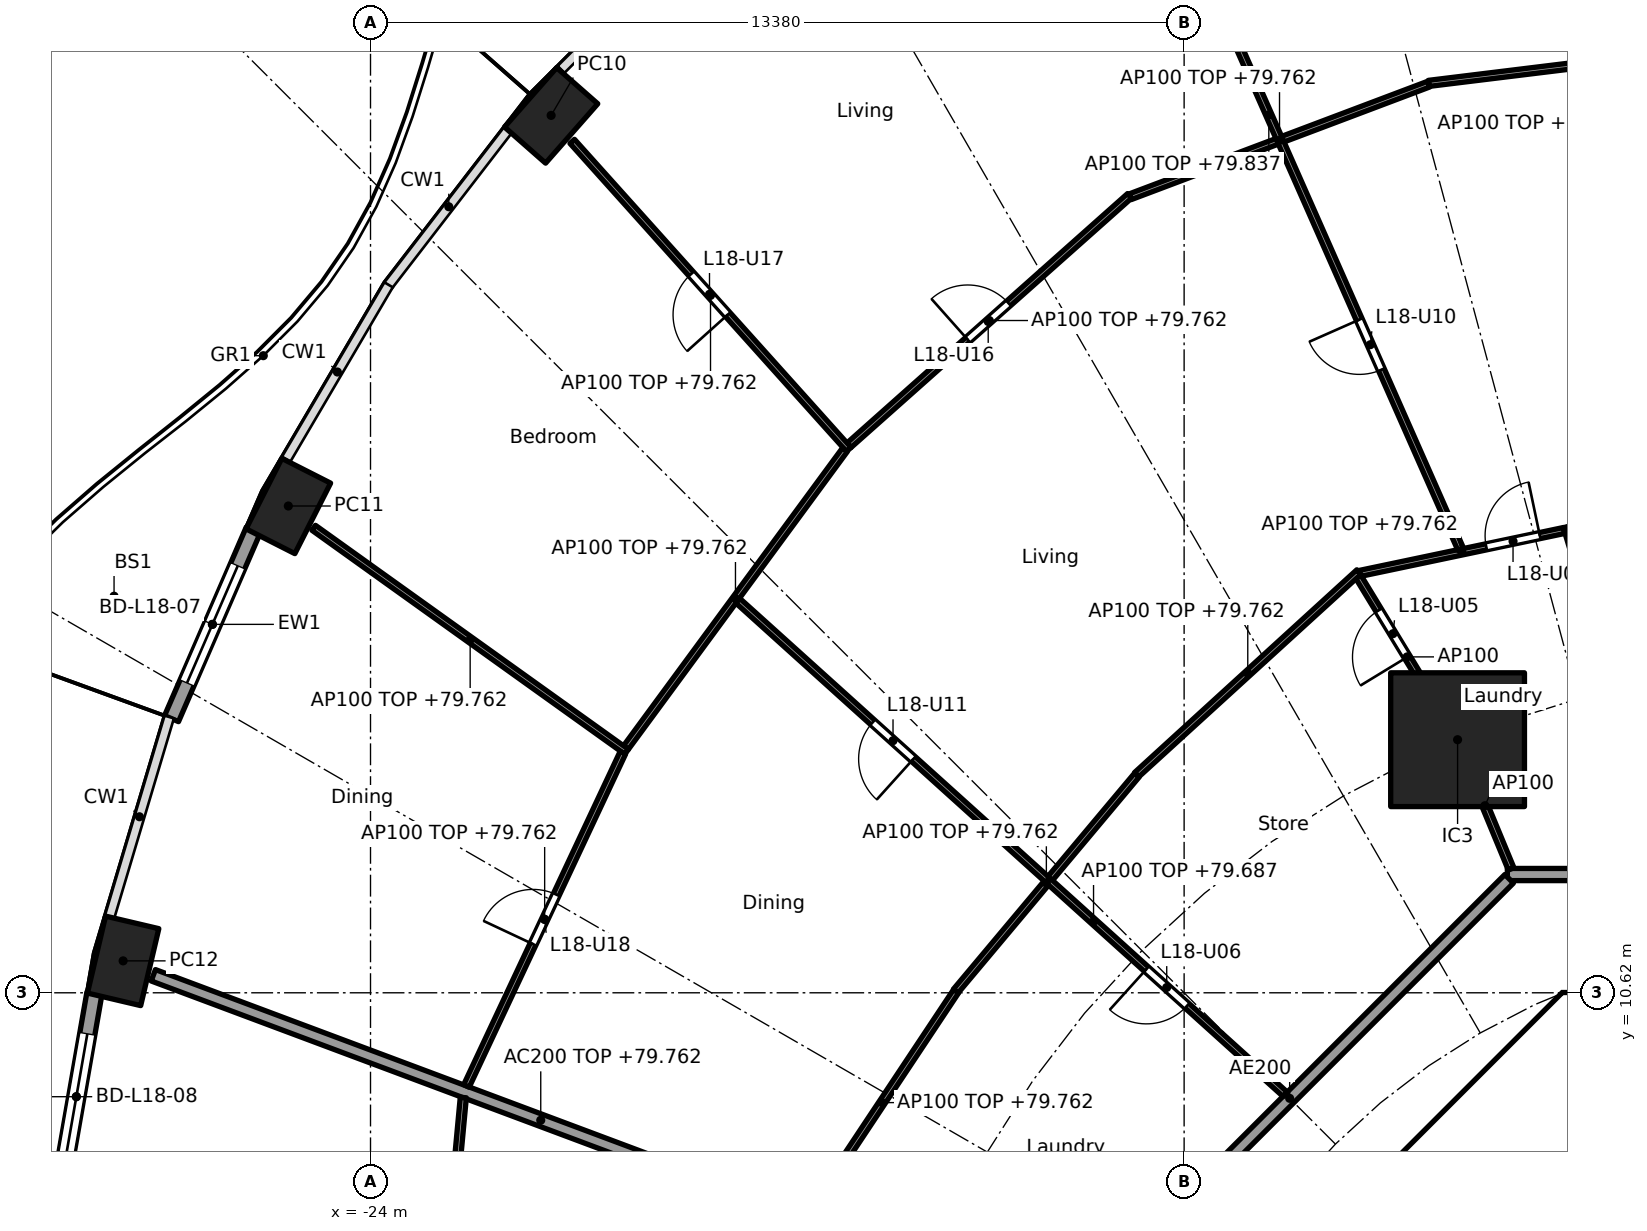
"""IFC4 building model, lengths in metres.
Left out: names, types, materials, properties, quantities, classifications, styles, units other than length and angle.
Written with IfcOpenShell. Run it as: python <this file> out.ifc"""

import sys

from ifc_helpers import new_model, si_unit, direction, frame, frame_2d, origin, origin_2d, place, context, subcontext, project, spatial, polyline, rectangle, hollow_rectangle, outline, extrude, element, fill, save


model = new_model("IFC4")
c1 = context("Model", 3, precision=1e-05, world=origin(), true_north=direction((0.0, 1.0)))
c2 = subcontext(c1, "Body", "Model", "MODEL_VIEW")
j1 = project(units=[si_unit("LENGTHUNIT", "METRE"), si_unit("PLANEANGLEUNIT", "RADIAN")], contexts=[c1])
p1 = place(None, origin())
s1 = spatial("IfcSite", under=j1, at=p1, CompositionType="ELEMENT")
p2 = place(p1, origin())
s2 = spatial("IfcBuilding", under=s1, at=p2, CompositionType="ELEMENT")
p3 = place(p2, frame((0.0, 0.0, 77.0)))
s3 = spatial("IfcBuildingStorey", under=s2, at=p3, CompositionType="ELEMENT", Elevation=77.0)
for number, where, z_axis, x_axis in (
    (1, (-21.03, 25.049, 0.0), (0.0, 0.0, 1.0), (-0.66, -0.751, 0.0)),
    (2, (-25.352, 18.625, 0.0), (0.0, 0.0, 1.0), (-0.452, -0.892, 0.0)),
    (3, (-28.068, 11.145, 0.0), (0.0, 0.0, 1.0), (-0.229, -0.973, 0.0)),
):
    element("IfcColumn", number, at=place(p3, frame(where, z_axis=z_axis, x_axis=x_axis)), inside=s3, PredefinedType="COLUMN", context=c2, shape_type="SweptSolid", body=[
        extrude(hollow_rectangle(XDim=1.3, YDim=0.9, WallThickness=0.045, at=origin_2d()), origin(), (0.0, 0.0, 1.0), 3.7),
    ])
p4 = place(p3, frame((-6.123, 14.782, 0.0), z_axis=(0.0, 0.0, 1.0), x_axis=(1.0, 0.0, 0.0)))
e4 = element("IfcColumn", 4, at=p4, inside=s3, PredefinedType="COLUMN", context=c2, shape_type="SweptSolid", body=[
    extrude(rectangle(XDim=2.2, YDim=2.2, at=origin_2d()), origin(), (0.0, 0.0, 1.0), 3.7),
])
p5 = place(p3, frame((-27.272, 15.128, 0.0), z_axis=(0.0, 0.0, 1.0), x_axis=(0.397682447205, 0.917523117521, 0.0)))
e5 = element("IfcWall", 5, at=p5, inside=s3, PredefinedType="SOLIDWALL", context=c2, shape_type="SweptSolid", body=[
    extrude(rectangle(XDim=3.38, YDim=0.25, at=frame_2d((1.69, 0.0))), origin(), (0.0, 0.0, 1.0), 3.44),
])
p6 = place(p5, frame((0.64, 0.0, 0.0)))
e6 = element("IfcOpeningElement", 6, at=p6, cuts=e5, PredefinedType="OPENING", context=c2, shape_type="SweptSolid", body=[
    extrude(rectangle(XDim=2.1, YDim=2.4, at=frame_2d((1.05, 1.2))), frame((0.0, 0.135, 0.0), z_axis=(0.0, -1.0, 0.0), x_axis=(1.0, 0.0, 0.0)), (0.0, 0.0, 1.0), 0.27),
])
p7 = place(p3, frame((-29.135, 7.21, 0.0), z_axis=(0.0, 0.0, 1.0), x_axis=(0.17223289558, 0.985056257114, 0.0)))
e7 = element("IfcWall", 7, at=p7, inside=s3, PredefinedType="SOLIDWALL", context=c2, shape_type="SweptSolid", body=[
    extrude(rectangle(XDim=3.454, YDim=0.25, at=frame_2d((1.727, 0.0))), origin(), (0.0, 0.0, 1.0), 3.44),
])
p8 = place(p7, frame((0.677, 0.0, 0.0)))
e8 = element("IfcOpeningElement", 8, at=p8, cuts=e7, PredefinedType="OPENING", context=c2, shape_type="SweptSolid", body=[
    extrude(rectangle(XDim=2.1, YDim=2.4, at=frame_2d((1.05, 1.2))), frame((0.0, 0.135, 0.0), z_axis=(0.0, -1.0, 0.0), x_axis=(1.0, 0.0, 0.0)), (0.0, 0.0, 1.0), 0.27),
])
p9 = place(p3, frame((-4.613, 9.988, 0.0), z_axis=(0.0, 0.0, 1.0), x_axis=(-0.707106781187, -0.707106781187, 0.0)))
e9 = element("IfcWall", 9, at=p9, inside=s3, PredefinedType="SHEAR", context=c2, shape_type="SweptSolid", body=[
    extrude(rectangle(XDim=7.602, YDim=0.6, at=frame_2d((3.801, 0.0))), origin(), (0.0, 0.0, 1.0), 3.44),
])
p10 = place(p9, frame((0.351, 0.0, 0.0)))
e10 = element("IfcOpeningElement", 10, at=p10, cuts=e9, PredefinedType="OPENING", context=c2, shape_type="SweptSolid", body=[
    extrude(rectangle(XDim=1.1, YDim=2.1, at=frame_2d((0.55, 1.05))), frame((0.0, 0.31, 0.0), z_axis=(0.0, -1.0, 0.0), x_axis=(1.0, 0.0, 0.0)), (0.0, 0.0, 1.0), 0.62),
])
p11 = place(p3, origin())
e11 = element("IfcWall", 11, at=p11, inside=s3, PredefinedType="SHEAR", context=c2, shape_type="SweptSolid", body=[
    extrude(outline(polyline([(-4.152, 10.025), (-4.401, 9.776), (-4.825, 10.2), (-4.401, 10.625), (4.401, 10.625), (4.825, 10.2), (4.401, 9.776), (4.152, 10.025), (-4.152, 10.025)])), origin(), (0.0, 0.0, 1.0), 3.44),
])
p12 = place(p3, frame((-14.829, 6.14, 0.0), z_axis=(0.0, 0.0, 1.0), x_axis=(-0.936597324342, 0.35040755134, 0.0)))
e12 = element("IfcWall", 12, at=p12, inside=s3, PredefinedType="PARTITIONING", context=c2, shape_type="SweptSolid", body=[
    extrude(rectangle(XDim=13.606, YDim=0.2, at=frame_2d((6.803, 0.0))), origin(), (0.0, 0.0, 1.0), 2.762),
])
p13 = place(p3, frame((5.104, 12.565, 0.0), z_axis=(0.0, 0.0, 1.0), x_axis=(-1.0, 0.0, 0.0)))
e13 = element("IfcWall", 13, at=p13, inside=s3, PredefinedType="PARTITIONING", context=c2, shape_type="SweptSolid", body=[
    extrude(rectangle(XDim=10.409, YDim=0.2, at=frame_2d((5.205, 0.0))), origin(), (0.0, 0.0, 1.0), 3.44),
])
p14 = place(p13, frame((0.751, 0.0, 0.0)))
e14 = element("IfcOpeningElement", 14, at=p14, cuts=e13, PredefinedType="OPENING", context=c2, shape_type="SweptSolid", body=[
    extrude(rectangle(XDim=1.0, YDim=2.1, at=frame_2d((0.5, 1.05))), frame((0.0, 0.11, 0.0), z_axis=(0.0, -1.0, 0.0), x_axis=(1.0, 0.0, 0.0)), (0.0, 0.0, 1.0), 0.22),
])
p15 = place(p3, frame((-5.275, 12.494, 0.0), z_axis=(0.0, 0.0, 1.0), x_axis=(-0.707106781187, -0.707106781187, 0.0)))
e15 = element("IfcWall", 15, at=p15, inside=s3, PredefinedType="PARTITIONING", context=c2, shape_type="SweptSolid", body=[
    extrude(rectangle(XDim=10.209, YDim=0.2, at=frame_2d((5.104, 0.0))), origin(), (0.0, 0.0, 1.0), 3.44),
])
p16 = place(p3, frame((-1.066, 26.253, 0.0), z_axis=(0.0, 0.0, 1.0), x_axis=(-0.992574197255, -0.121640712523, 0.0)))
e16 = element("IfcWall", 16, at=p16, inside=s3, PredefinedType="PARTITIONING", context=c2, shape_type="SweptSolid", body=[
    extrude(rectangle(XDim=5.574, YDim=0.1, at=frame_2d((2.787, 0.0))), origin(), (0.0, 0.0, 1.0), 2.762),
])
p17 = place(p16, frame((0.969, 0.0, 0.0)))
e17 = element("IfcOpeningElement", 17, at=p17, cuts=e16, PredefinedType="OPENING", context=c2, shape_type="SweptSolid", body=[
    extrude(rectangle(XDim=0.9, YDim=2.1, at=frame_2d((0.45, 1.05))), frame((0.0, 0.06, 0.0), z_axis=(0.0, -1.0, 0.0), x_axis=(1.0, 0.0, 0.0)), (0.0, 0.0, 1.0), 0.12),
])
p18 = place(p3, frame((-3.842, 25.963, 0.0), z_axis=(0.0, 0.0, 1.0), x_axis=(-0.184068442651, 0.982913428752, 0.0)))
e18 = element("IfcWall", 18, at=p18, inside=s3, PredefinedType="PARTITIONING", context=c2, shape_type="SweptSolid", body=[
    extrude(rectangle(XDim=8.506, YDim=0.1, at=frame_2d((4.253, 0.0))), origin(), (0.0, 0.0, 1.0), 2.837),
])
p19 = place(p18, frame((3.803, 0.0, 0.0)))
e19 = element("IfcOpeningElement", 19, at=p19, cuts=e18, PredefinedType="OPENING", context=c2, shape_type="SweptSolid", body=[
    extrude(rectangle(XDim=0.9, YDim=2.1, at=frame_2d((0.45, 1.05))), frame((0.0, 0.06, 0.0), z_axis=(0.0, -1.0, 0.0), x_axis=(1.0, 0.0, 0.0)), (0.0, 0.0, 1.0), 0.12),
])
p20 = place(p3, frame((-2.631, 12.66, 0.0), z_axis=(0.0, 0.0, 1.0), x_axis=(-0.290145836284, 0.956982441682, 0.0)))
e20 = element("IfcWall", 20, at=p20, inside=s3, PredefinedType="PARTITIONING", context=c2, shape_type="SweptSolid", body=[
    extrude(rectangle(XDim=5.873, YDim=0.1, at=frame_2d((2.937, 0.0))), origin(), (0.0, 0.0, 1.0), 2.687),
])
p21 = place(p20, frame((0.772, 0.0, 0.0)))
e21 = element("IfcOpeningElement", 21, at=p21, cuts=e20, PredefinedType="OPENING", context=c2, shape_type="SweptSolid", body=[
    extrude(rectangle(XDim=0.9, YDim=2.1, at=frame_2d((0.45, 1.05))), frame((0.0, 0.06, 0.0), z_axis=(0.0, -1.0, 0.0), x_axis=(1.0, 0.0, 0.0)), (0.0, 0.0, 1.0), 0.12),
])
p22 = place(p3, frame((-4.37, 18.223, 0.0), z_axis=(0.0, 0.0, 1.0), x_axis=(-0.978619056583, -0.205681166112, 0.0)))
e22 = element("IfcWall", 22, at=p22, inside=s3, PredefinedType="PARTITIONING", context=c2, shape_type="SweptSolid", body=[
    extrude(rectangle(XDim=3.438, YDim=0.1, at=frame_2d((1.719, 0.0))), origin(), (0.0, 0.0, 1.0), 2.762),
])
p23 = place(p22, frame((0.409, 0.0, 0.0)))
e23 = element("IfcOpeningElement", 23, at=p23, cuts=e22, PredefinedType="OPENING", context=c2, shape_type="SweptSolid", body=[
    extrude(rectangle(XDim=0.9, YDim=2.1, at=frame_2d((0.45, 1.05))), frame((0.0, 0.06, 0.0), z_axis=(0.0, -1.0, 0.0), x_axis=(1.0, 0.0, 0.0)), (0.0, 0.0, 1.0), 0.12),
])
p24 = place(p3, frame((-6.596, 25.563, 0.0), z_axis=(0.0, 0.0, 1.0), x_axis=(-0.9356162121, -0.353018843201, 0.0)))
e24 = element("IfcWall", 24, at=p24, inside=s3, PredefinedType="PARTITIONING", context=c2, shape_type="SweptSolid", body=[
    extrude(rectangle(XDim=5.249, YDim=0.1, at=frame_2d((2.625, 0.0))), origin(), (0.0, 0.0, 1.0), 2.762),
])
p25 = place(p3, frame((-6.072, 17.915, 0.0), z_axis=(0.0, 0.0, 1.0), x_axis=(-0.404139814253, 0.914697223422, 0.0)))
e25 = element("IfcWall", 25, at=p25, inside=s3, PredefinedType="PARTITIONING", context=c2, shape_type="SweptSolid", body=[
    extrude(rectangle(XDim=15.614, YDim=0.1, at=frame_2d((7.807, 0.0))), origin(), (0.0, 0.0, 1.0), 2.837),
])
p26 = place(p25, frame((3.226, 0.0, 0.0)))
e26 = element("IfcOpeningElement", 26, at=p26, cuts=e25, PredefinedType="OPENING", context=c2, shape_type="SweptSolid", body=[
    extrude(rectangle(XDim=0.9, YDim=2.1, at=frame_2d((0.45, 1.05))), frame((0.0, 0.06, 0.0), z_axis=(0.0, -1.0, 0.0), x_axis=(1.0, 0.0, 0.0)), (0.0, 0.0, 1.0), 0.12),
])
p27 = place(p3, frame((-5.243, 12.657, 0.0), z_axis=(0.0, 0.0, 1.0), x_axis=(-0.382703272338, 0.923871314276, 0.0)))
e27 = element("IfcWall", 27, at=p27, inside=s3, PredefinedType="PARTITIONING", context=c2, shape_type="SweptSolid", body=[
    extrude(rectangle(XDim=2.249, YDim=0.1, at=frame_2d((1.125, 0.0))), origin(), (0.0, 0.0, 1.0), 3.44),
])
p28 = place(p3, frame((-6.149, 14.825, 0.0), z_axis=(0.0, 0.0, 1.0), x_axis=(-0.520433196839, 0.853902387646, 0.0)))
e28 = element("IfcWall", 28, at=p28, inside=s3, PredefinedType="PARTITIONING", context=c2, shape_type="SweptSolid", body=[
    extrude(rectangle(XDim=3.09, YDim=0.1, at=frame_2d((1.545, 0.0))), origin(), (0.0, 0.0, 1.0), 3.44),
])
p29 = place(p28, frame((1.542, 0.0, 0.0)))
e29 = element("IfcOpeningElement", 29, at=p29, cuts=e28, PredefinedType="OPENING", context=c2, shape_type="SweptSolid", body=[
    extrude(rectangle(XDim=0.9, YDim=2.1, at=frame_2d((0.45, 1.05))), frame((0.0, 0.06, 0.0), z_axis=(0.0, -1.0, 0.0), x_axis=(1.0, 0.0, 0.0)), (0.0, 0.0, 1.0), 0.12),
])
p30 = place(p3, frame((-7.746, 17.539, 0.0), z_axis=(0.0, 0.0, 1.0), x_axis=(-0.738860434967, -0.673858484877, 0.0)))
e30 = element("IfcWall", 30, at=p30, inside=s3, PredefinedType="PARTITIONING", context=c2, shape_type="SweptSolid", body=[
    extrude(rectangle(XDim=4.947, YDim=0.1, at=frame_2d((2.473, 0.0))), origin(), (0.0, 0.0, 1.0), 2.762),
])
p31 = place(p3, frame((-11.516, 23.726, 0.0), z_axis=(0.0, 0.0, 1.0), x_axis=(-0.747428955243, -0.664341747043, 0.0)))
e31 = element("IfcWall", 31, at=p31, inside=s3, PredefinedType="PARTITIONING", context=c2, shape_type="SweptSolid", body=[
    extrude(rectangle(XDim=6.174, YDim=0.1, at=frame_2d((3.087, 0.0))), origin(), (0.0, 0.0, 1.0), 2.762),
])
p32 = place(p31, frame((2.662, 0.0, 0.0)))
e32 = element("IfcOpeningElement", 32, at=p32, cuts=e31, PredefinedType="OPENING", context=c2, shape_type="SweptSolid", body=[
    extrude(rectangle(XDim=0.9, YDim=2.1, at=frame_2d((0.45, 1.05))), frame((0.0, 0.06, 0.0), z_axis=(0.0, -1.0, 0.0), x_axis=(1.0, 0.0, 0.0)), (0.0, 0.0, 1.0), 0.12),
])
p33 = place(p3, frame((-11.396, 14.202, 0.0), z_axis=(0.0, 0.0, 1.0), x_axis=(-0.642475660273, -0.766306091557, 0.0)))
e33 = element("IfcWall", 33, at=p33, inside=s3, PredefinedType="PARTITIONING", context=c2, shape_type="SweptSolid", body=[
    extrude(rectangle(XDim=4.637, YDim=0.1, at=frame_2d((2.319, 0.0))), origin(), (0.0, 0.0, 1.0), 2.762),
])
p34 = place(p3, frame((-16.134, 19.554, 0.0), z_axis=(0.0, 0.0, 1.0), x_axis=(-0.667985610263, 0.74417418961, 0.0)))
e34 = element("IfcWall", 34, at=p34, inside=s3, PredefinedType="PARTITIONING", context=c2, shape_type="SweptSolid", body=[
    extrude(rectangle(XDim=6.809, YDim=0.1, at=frame_2d((3.405, 0.0))), origin(), (0.0, 0.0, 1.0), 2.762),
])
p35 = place(p34, frame((2.98, 0.0, 0.0)))
e35 = element("IfcOpeningElement", 35, at=p35, cuts=e34, PredefinedType="OPENING", context=c2, shape_type="SweptSolid", body=[
    extrude(rectangle(XDim=0.9, YDim=2.1, at=frame_2d((0.45, 1.05))), frame((0.0, 0.06, 0.0), z_axis=(0.0, -1.0, 0.0), x_axis=(1.0, 0.0, 0.0)), (0.0, 0.0, 1.0), 0.12),
])
p36 = place(p3, frame((-16.197, 19.551, 0.0), z_axis=(0.0, 0.0, 1.0), x_axis=(-0.592391983588, -0.80564988536, 0.0)))
e36 = element("IfcWall", 36, at=p36, inside=s3, PredefinedType="PARTITIONING", context=c2, shape_type="SweptSolid", body=[
    extrude(rectangle(XDim=6.08, YDim=0.1, at=frame_2d((3.04, 0.0))), origin(), (0.0, 0.0, 1.0), 2.762),
])
p37 = place(p3, frame((-8.959, 8.952, 0.0), z_axis=(0.0, 0.0, 1.0), x_axis=(-0.742679904999, 0.669646592398, 0.0)))
e37 = element("IfcWall", 37, at=p37, inside=s3, PredefinedType="PARTITIONING", context=c2, shape_type="SweptSolid", body=[
    extrude(rectangle(XDim=12.121, YDim=0.1, at=frame_2d((6.061, 0.0))), origin(), (0.0, 0.0, 1.0), 2.687),
])
p38 = place(p37, frame((2.172, 0.0, 0.0)))
e38 = element("IfcOpeningElement", 38, at=p38, cuts=e37, PredefinedType="OPENING", context=c2, shape_type="SweptSolid", body=[
    extrude(rectangle(XDim=0.9, YDim=2.1, at=frame_2d((0.45, 1.05))), frame((0.0, 0.06, 0.0), z_axis=(0.0, -1.0, 0.0), x_axis=(1.0, 0.0, 0.0)), (0.0, 0.0, 1.0), 0.12),
])
p39 = place(p37, frame((8.233, 0.0, 0.0)))
e39 = element("IfcOpeningElement", 39, at=p39, cuts=e37, PredefinedType="OPENING", context=c2, shape_type="SweptSolid", body=[
    extrude(rectangle(XDim=0.9, YDim=2.1, at=frame_2d((0.45, 1.05))), frame((0.0, 0.06, 0.0), z_axis=(0.0, -1.0, 0.0), x_axis=(1.0, 0.0, 0.0)), (0.0, 0.0, 1.0), 0.12),
])
p40 = place(p3, frame((-14.371, 10.645, 0.0), z_axis=(0.0, 0.0, 1.0), x_axis=(-0.553341009285, -0.832954817168, 0.0)))
e40 = element("IfcWall", 40, at=p40, inside=s3, PredefinedType="PARTITIONING", context=c2, shape_type="SweptSolid", body=[
    extrude(rectangle(XDim=4.396, YDim=0.1, at=frame_2d((2.198, 0.0))), origin(), (0.0, 0.0, 1.0), 2.762),
])
p41 = place(p3, frame((-19.788, 14.583, 0.0), z_axis=(0.0, 0.0, 1.0), x_axis=(-0.813175286569, 0.58201885993, 0.0)))
e41 = element("IfcWall", 41, at=p41, inside=s3, PredefinedType="PARTITIONING", context=c2, shape_type="SweptSolid", body=[
    extrude(rectangle(XDim=6.329, YDim=0.1, at=frame_2d((3.164, 0.0))), origin(), (0.0, 0.0, 1.0), 2.762),
])
p42 = place(p3, frame((-19.85, 14.567, 0.0), z_axis=(0.0, 0.0, 1.0), x_axis=(-0.424942210745, -0.905220480064, 0.0)))
e42 = element("IfcWall", 42, at=p42, inside=s3, PredefinedType="PARTITIONING", context=c2, shape_type="SweptSolid", body=[
    extrude(rectangle(XDim=6.053, YDim=0.1, at=frame_2d((3.027, 0.0))), origin(), (0.0, 0.0, 1.0), 2.762),
])
p43 = place(p42, frame((2.577, 0.0, 0.0)))
e43 = element("IfcOpeningElement", 43, at=p43, cuts=e42, PredefinedType="OPENING", context=c2, shape_type="SweptSolid", body=[
    extrude(rectangle(XDim=0.9, YDim=2.1, at=frame_2d((0.45, 1.05))), frame((0.0, 0.06, 0.0), z_axis=(0.0, -1.0, 0.0), x_axis=(1.0, 0.0, 0.0)), (0.0, 0.0, 1.0), 0.12),
])
p44 = place(p3, frame((-22.474, 8.898, 0.0), z_axis=(0.0, 0.0, 1.0), x_axis=(-0.092756864489, -0.995688788774, 0.0)))
e44 = element("IfcWall", 44, at=p44, inside=s3, PredefinedType="PARTITIONING", context=c2, shape_type="SweptSolid", body=[
    extrude(rectangle(XDim=6.283, YDim=0.1, at=frame_2d((3.141, 0.0))), origin(), (0.0, 0.0, 1.0), 2.762),
])
p45 = place(p44, frame((2.691, 0.0, 0.0)))
e45 = element("IfcOpeningElement", 45, at=p45, cuts=e44, PredefinedType="OPENING", context=c2, shape_type="SweptSolid", body=[
    extrude(rectangle(XDim=0.9, YDim=2.1, at=frame_2d((0.45, 1.05))), frame((0.0, 0.06, 0.0), z_axis=(0.0, -1.0, 0.0), x_axis=(1.0, 0.0, 0.0)), (0.0, 0.0, 1.0), 0.12),
])
p46 = place(p6, origin())
e46 = element("IfcDoor", 46, at=p46, inside=s3, OperationType="SLIDING_TO_LEFT", PredefinedType="DOOR", context=c2, shape_type="SweptSolid", body=[
    extrude(rectangle(XDim=2.1, YDim=2.4, at=frame_2d((1.05, 1.2))), frame((0.0, 0.025, 0.0), z_axis=(0.0, -1.0, 0.0), x_axis=(1.0, 0.0, 0.0)), (0.0, 0.0, 1.0), 0.05),
])
fill(e6, e46)
p47 = place(p8, origin())
e47 = element("IfcDoor", 47, at=p47, inside=s3, OperationType="SLIDING_TO_LEFT", PredefinedType="DOOR", context=c2, shape_type="SweptSolid", body=[
    extrude(rectangle(XDim=2.1, YDim=2.4, at=frame_2d((1.05, 1.2))), frame((0.0, 0.025, 0.0), z_axis=(0.0, -1.0, 0.0), x_axis=(1.0, 0.0, 0.0)), (0.0, 0.0, 1.0), 0.05),
])
fill(e8, e47)
p48 = place(p10, origin())
e48 = element("IfcDoor", 48, at=p48, inside=s3, OperationType="SINGLE_SWING_LEFT", PredefinedType="DOOR", context=c2, shape_type="SweptSolid", body=[
    extrude(rectangle(XDim=1.1, YDim=2.1, at=frame_2d((0.55, 1.05))), frame((0.0, 0.025, 0.0), z_axis=(0.0, -1.0, 0.0), x_axis=(1.0, 0.0, 0.0)), (0.0, 0.0, 1.0), 0.05),
])
fill(e10, e48)
p49 = place(p29, origin())
e49 = element("IfcDoor", 49, at=p49, inside=s3, OperationType="SINGLE_SWING_LEFT", PredefinedType="DOOR", context=c2, shape_type="SweptSolid", body=[
    extrude(rectangle(XDim=0.9, YDim=2.1, at=frame_2d((0.45, 1.05))), frame((0.0, 0.025, 0.0), z_axis=(0.0, -1.0, 0.0), x_axis=(1.0, 0.0, 0.0)), (0.0, 0.0, 1.0), 0.05),
])
fill(e29, e49)
p50 = place(p38, origin())
e50 = element("IfcDoor", 50, at=p50, inside=s3, OperationType="SINGLE_SWING_RIGHT", PredefinedType="DOOR", context=c2, shape_type="SweptSolid", body=[
    extrude(rectangle(XDim=0.9, YDim=2.1, at=frame_2d((0.45, 1.05))), frame((0.0, 0.025, 0.0), z_axis=(0.0, -1.0, 0.0), x_axis=(1.0, 0.0, 0.0)), (0.0, 0.0, 1.0), 0.05),
])
fill(e38, e50)
p51 = place(p23, frame((0.9, 0.0, 0.0), x_axis=(-1.0, 0.0, 0.0)))
e51 = element("IfcDoor", 51, at=p51, inside=s3, OperationType="SINGLE_SWING_RIGHT", PredefinedType="DOOR", context=c2, shape_type="SweptSolid", body=[
    extrude(rectangle(XDim=0.9, YDim=2.1, at=frame_2d((0.45, 1.05))), frame((0.0, 0.025, 0.0), z_axis=(0.0, -1.0, 0.0), x_axis=(1.0, 0.0, 0.0)), (0.0, 0.0, 1.0), 0.05),
])
fill(e23, e51)
p52 = place(p26, origin())
e52 = element("IfcDoor", 52, at=p52, inside=s3, OperationType="SINGLE_SWING_RIGHT", PredefinedType="DOOR", context=c2, shape_type="SweptSolid", body=[
    extrude(rectangle(XDim=0.9, YDim=2.1, at=frame_2d((0.45, 1.05))), frame((0.0, 0.025, 0.0), z_axis=(0.0, -1.0, 0.0), x_axis=(1.0, 0.0, 0.0)), (0.0, 0.0, 1.0), 0.05),
])
fill(e26, e52)
p53 = place(p39, origin())
e53 = element("IfcDoor", 53, at=p53, inside=s3, OperationType="SINGLE_SWING_LEFT", PredefinedType="DOOR", context=c2, shape_type="SweptSolid", body=[
    extrude(rectangle(XDim=0.9, YDim=2.1, at=frame_2d((0.45, 1.05))), frame((0.0, 0.025, 0.0), z_axis=(0.0, -1.0, 0.0), x_axis=(1.0, 0.0, 0.0)), (0.0, 0.0, 1.0), 0.05),
])
fill(e39, e53)
p54 = place(p32, frame((0.9, 0.0, 0.0), x_axis=(-1.0, 0.0, 0.0)))
e54 = element("IfcDoor", 54, at=p54, inside=s3, OperationType="SINGLE_SWING_LEFT", PredefinedType="DOOR", context=c2, shape_type="SweptSolid", body=[
    extrude(rectangle(XDim=0.9, YDim=2.1, at=frame_2d((0.45, 1.05))), frame((0.0, 0.025, 0.0), z_axis=(0.0, -1.0, 0.0), x_axis=(1.0, 0.0, 0.0)), (0.0, 0.0, 1.0), 0.05),
])
fill(e32, e54)
p55 = place(p35, origin())
e55 = element("IfcDoor", 55, at=p55, inside=s3, OperationType="SINGLE_SWING_LEFT", PredefinedType="DOOR", context=c2, shape_type="SweptSolid", body=[
    extrude(rectangle(XDim=0.9, YDim=2.1, at=frame_2d((0.45, 1.05))), frame((0.0, 0.025, 0.0), z_axis=(0.0, -1.0, 0.0), x_axis=(1.0, 0.0, 0.0)), (0.0, 0.0, 1.0), 0.05),
])
fill(e35, e55)
p56 = place(p43, frame((0.9, 0.0, 0.0), x_axis=(-1.0, 0.0, 0.0)))
e56 = element("IfcDoor", 56, at=p56, inside=s3, OperationType="SINGLE_SWING_LEFT", PredefinedType="DOOR", context=c2, shape_type="SweptSolid", body=[
    extrude(rectangle(XDim=0.9, YDim=2.1, at=frame_2d((0.45, 1.05))), frame((0.0, 0.025, 0.0), z_axis=(0.0, -1.0, 0.0), x_axis=(1.0, 0.0, 0.0)), (0.0, 0.0, 1.0), 0.05),
])
fill(e43, e56)
save(model, sys.argv[1])
